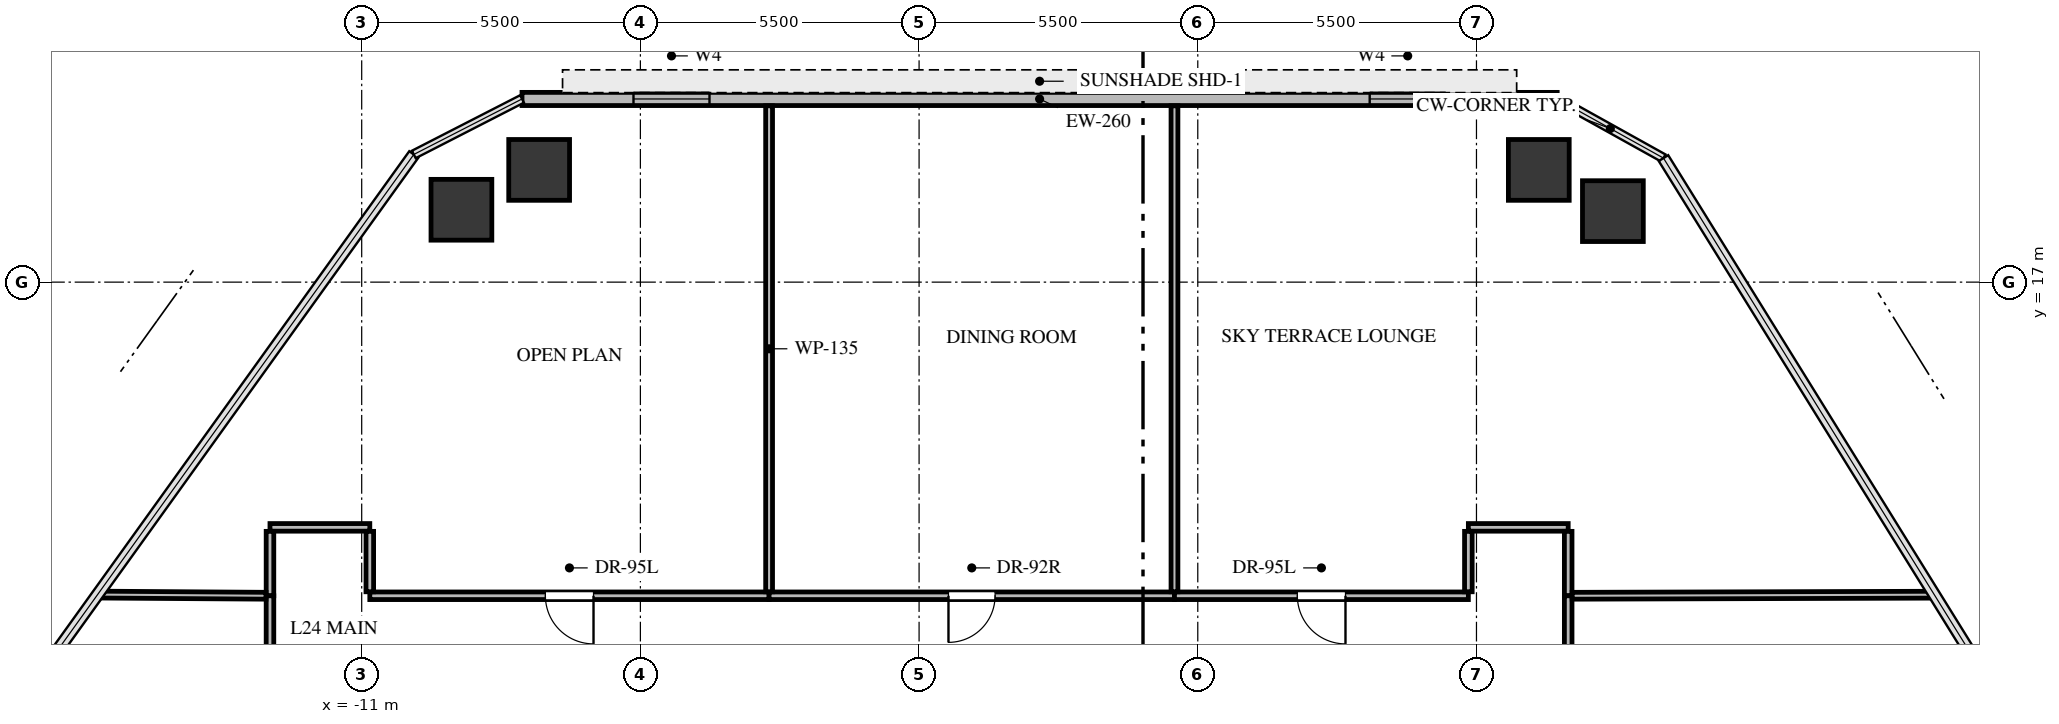
"""IFC4 building model, lengths in metres.
Left out: names, types, materials, properties, quantities, classifications, styles, units other than length and angle.
Written with IfcOpenShell. Run it as: python <this file> out.ifc"""

import sys

from ifc_helpers import new_model, si_unit, direction, frame, frame_2d, origin, origin_2d, place, context, subcontext, project, spatial, rectangle, extrude, source, transform, mapped, element, fill, save


model = new_model("IFC4")
c1 = context("Model", 3, precision=1e-05, world=origin(), true_north=direction((0.0, 1.0)))
c2 = subcontext(c1, "Body", "Model", "MODEL_VIEW")
j1 = project(units=[si_unit("LENGTHUNIT", "METRE"), si_unit("PLANEANGLEUNIT", "RADIAN")], contexts=[c1])
p1 = place(None, origin())
s1 = spatial("IfcSite", under=j1, at=p1, CompositionType="ELEMENT")
p2 = place(p1, origin())
s2 = spatial("IfcBuilding", under=s1, at=p2, CompositionType="ELEMENT")
p3 = place(p2, frame((0.0, 0.0, 93.3)))
s3 = spatial("IfcBuildingStorey", under=s2, at=p3, CompositionType="ELEMENT", Elevation=93.3)
m1 = source(origin(), c2, "Body", "SweptSolid", [
    extrude(rectangle(XDim=1.2, YDim=1.2, at=origin_2d()), origin(), (0.0, 0.0, 1.0), 4.26),
])
for number, where, z_axis, x_axis in (
    (1, (-9.032, 18.428, -0.3), (0.0, 0.0, 1.0), (1.0, 0.0, 0.0)),
    (2, (-7.498, 19.215, -0.3), (0.0, 0.0, 1.0), (1.0, 0.0, 0.0)),
    (3, (12.23, 19.215, -0.3), (0.0, 0.0, 1.0), (1.0, 0.0, 0.0)),
    (4, (13.692, 18.401, -0.3), (0.0, 0.0, 1.0), (1.0, 0.0, 0.0)),
):
    element("IfcColumn", number, at=place(p3, frame(where, z_axis=z_axis, x_axis=x_axis)), inside=s3, PredefinedType="COLUMN", context=c2, shape_type="MappedRepresentation", body=[
        mapped(m1, transform((0.0, 0.0, 0.0), x_axis=(1.0, 0.0, 0.0), y_axis=(0.0, 1.0, 0.0), z_axis=(0.0, 0.0, 1.0), scale=1.0)),
    ])
p4 = place(p3, frame((-7.836, 20.615, 0.0), z_axis=(0.0, 0.0, 1.0), x_axis=(1.0, 0.0, 0.0)))
e5 = element("IfcWall", 5, at=p4, inside=s3, PredefinedType="SOLIDWALL", context=c2, shape_type="SweptSolid", body=[
    extrude(rectangle(XDim=20.429, YDim=0.26, at=frame_2d((10.215, 0.0))), origin(), (0.0, 0.0, 1.0), 3.96),
])
p5 = place(p4, frame((2.2, 0.0, 0.9)))
e6 = element("IfcOpeningElement", 6, at=p5, cuts=e5, PredefinedType="OPENING", context=c2, shape_type="SweptSolid", body=[
    extrude(rectangle(XDim=1.5, YDim=1.6, at=frame_2d((0.75, 0.8))), frame((0.0, 0.14, 0.0), z_axis=(0.0, -1.0, 0.0), x_axis=(1.0, 0.0, 0.0)), (0.0, 0.0, 1.0), 0.28),
])
p6 = place(p4, frame((16.729, 0.0, 0.9)))
e7 = element("IfcOpeningElement", 7, at=p6, cuts=e5, PredefinedType="OPENING", context=c2, shape_type="SweptSolid", body=[
    extrude(rectangle(XDim=1.5, YDim=1.6, at=frame_2d((0.75, 0.8))), frame((0.0, 0.14, 0.0), z_axis=(0.0, -1.0, 0.0), x_axis=(1.0, 0.0, 0.0)), (0.0, 0.0, 1.0), 0.28),
])
p7 = place(p3, frame((-2.96, 10.81, 0.0), z_axis=(0.0, 0.0, 1.0), x_axis=(-1.0, 0.0, 0.0)))
e8 = element("IfcWall", 8, at=p7, inside=s3, PredefinedType="PARTITIONING", context=c2, shape_type="SweptSolid", body=[
    extrude(rectangle(XDim=7.88, YDim=0.15, at=frame_2d((3.94, 0.0))), origin(), (0.0, 0.0, 1.0), 3.112),
])
p8 = place(p7, frame((3.465, 0.0, 0.0)))
e9 = element("IfcOpeningElement", 9, at=p8, cuts=e8, PredefinedType="OPENING", context=c2, shape_type="SweptSolid", body=[
    extrude(rectangle(XDim=0.95, YDim=2.1, at=frame_2d((0.475, 1.05))), frame((0.0, 0.085, 0.0), z_axis=(0.0, -1.0, 0.0), x_axis=(1.0, 0.0, 0.0)), (0.0, 0.0, 1.0), 0.17),
])
p9 = place(p3, frame((-10.84, 12.16, 0.0), z_axis=(0.0, 0.0, 1.0), x_axis=(-1.0, 0.0, 0.0)))
e10 = element("IfcWall", 10, at=p9, inside=s3, PredefinedType="PARTITIONING", context=c2, shape_type="SweptSolid", body=[
    extrude(rectangle(XDim=1.97, YDim=0.15, at=frame_2d((0.985, 0.0))), origin(), (0.0, 0.0, 1.0), 3.945),
])
p10 = place(p3, frame((-10.84, 10.889, 0.0), z_axis=(0.0, 0.0, 1.0), x_axis=(0.0, 1.0, 0.0)))
e11 = element("IfcWall", 11, at=p10, inside=s3, PredefinedType="PARTITIONING", context=c2, shape_type="SweptSolid", body=[
    extrude(rectangle(XDim=1.192, YDim=0.15, at=frame_2d((0.596, 0.0))), origin(), (0.0, 0.0, 1.0), 3.945),
])
p11 = place(p3, frame((-12.81, 12.081, 0.0), z_axis=(0.0, 0.0, 1.0), x_axis=(0.0, -1.0, 0.0)))
e12 = element("IfcWall", 12, at=p11, inside=s3, PredefinedType="PARTITIONING", context=c2, shape_type="SweptSolid", body=[
    extrude(rectangle(XDim=1.271, YDim=0.15, at=frame_2d((0.635, 0.0))), origin(), (0.0, 0.0, 1.0), 3.945),
])
p12 = place(p3, frame((5.04, 10.81, 0.0), z_axis=(0.0, 0.0, 1.0), x_axis=(-1.0, 0.0, 0.0)))
e13 = element("IfcWall", 13, at=p12, inside=s3, PredefinedType="PARTITIONING", context=c2, shape_type="SweptSolid", body=[
    extrude(rectangle(XDim=8.0, YDim=0.15, at=frame_2d((4.0, 0.0))), origin(), (0.0, 0.0, 1.0), 3.508),
])
p13 = place(p12, frame((3.54, 0.0, 0.0)))
e14 = element("IfcOpeningElement", 14, at=p13, cuts=e13, PredefinedType="OPENING", context=c2, shape_type="SweptSolid", body=[
    extrude(rectangle(XDim=0.92, YDim=2.1, at=frame_2d((0.46, 1.05))), frame((0.0, 0.085, 0.0), z_axis=(0.0, -1.0, 0.0), x_axis=(1.0, 0.0, 0.0)), (0.0, 0.0, 1.0), 0.17),
])
p14 = place(p3, frame((10.84, 10.81, 0.0), z_axis=(0.0, 0.0, 1.0), x_axis=(-1.0, 0.0, 0.0)))
e15 = element("IfcWall", 15, at=p14, inside=s3, PredefinedType="PARTITIONING", context=c2, shape_type="SweptSolid", body=[
    extrude(rectangle(XDim=5.8, YDim=0.15, at=frame_2d((2.9, 0.0))), origin(), (0.0, 0.0, 1.0), 3.112),
])
p15 = place(p14, frame((2.425, 0.0, 0.0)))
e16 = element("IfcOpeningElement", 16, at=p15, cuts=e15, PredefinedType="OPENING", context=c2, shape_type="SweptSolid", body=[
    extrude(rectangle(XDim=0.95, YDim=2.1, at=frame_2d((0.475, 1.05))), frame((0.0, 0.085, 0.0), z_axis=(0.0, -1.0, 0.0), x_axis=(1.0, 0.0, 0.0)), (0.0, 0.0, 1.0), 0.17),
])
p16 = place(p3, frame((12.81, 12.16, 0.0), z_axis=(0.0, 0.0, 1.0), x_axis=(-1.0, 0.0, 0.0)))
e17 = element("IfcWall", 17, at=p16, inside=s3, PredefinedType="PARTITIONING", context=c2, shape_type="SweptSolid", body=[
    extrude(rectangle(XDim=1.97, YDim=0.15, at=frame_2d((0.985, 0.0))), origin(), (0.0, 0.0, 1.0), 3.112),
])
p17 = place(p3, frame((12.81, 10.81, 0.0), z_axis=(0.0, 0.0, 1.0), x_axis=(0.0, 1.0, 0.0)))
e18 = element("IfcWall", 18, at=p17, inside=s3, PredefinedType="PARTITIONING", context=c2, shape_type="SweptSolid", body=[
    extrude(rectangle(XDim=1.271, YDim=0.15, at=frame_2d((0.635, 0.0))), origin(), (0.0, 0.0, 1.0), 3.945),
])
p18 = place(p3, frame((10.84, 12.081, 0.0), z_axis=(0.0, 0.0, 1.0), x_axis=(0.0, -1.0, 0.0)))
e19 = element("IfcWall", 19, at=p18, inside=s3, PredefinedType="PARTITIONING", context=c2, shape_type="SweptSolid", body=[
    extrude(rectangle(XDim=1.192, YDim=0.15, at=frame_2d((0.596, 0.0))), origin(), (0.0, 0.0, 1.0), 3.112),
])
p19 = place(p3, frame((-12.81, 10.81, 0.0), z_axis=(0.0, 0.0, 1.0), x_axis=(0.0, -1.0, 0.0)))
e20 = element("IfcWall", 20, at=p19, inside=s3, PredefinedType="PARTITIONING", context=c2, shape_type="SweptSolid", body=[
    extrude(rectangle(XDim=21.62, YDim=0.15, at=frame_2d((10.81, 0.0))), origin(), (0.0, 0.0, 1.0), 3.112),
])
p20 = place(p19, frame((10.36, 0.0, 0.0)))
e21 = element("IfcOpeningElement", 21, at=p20, cuts=e20, PredefinedType="OPENING", context=c2, shape_type="SweptSolid", body=[
    extrude(rectangle(XDim=0.9, YDim=2.05, at=frame_2d((0.45, 1.025))), frame((0.0, 0.085, 0.0), z_axis=(0.0, -1.0, 0.0), x_axis=(1.0, 0.0, 0.0)), (0.0, 0.0, 1.0), 0.17),
])
p21 = place(p3, frame((12.81, 2.49, 0.0), z_axis=(0.0, 0.0, 1.0), x_axis=(0.0, 1.0, 0.0)))
e22 = element("IfcWall", 22, at=p21, inside=s3, PredefinedType="PARTITIONING", context=c2, shape_type="SweptSolid", body=[
    extrude(rectangle(XDim=8.32, YDim=0.15, at=frame_2d((4.16, 0.0))), origin(), (0.0, 0.0, 1.0), 3.945),
])
p22 = place(p21, frame((3.7, 0.0, 0.0)))
e23 = element("IfcOpeningElement", 23, at=p22, cuts=e22, PredefinedType="OPENING", context=c2, shape_type="SweptSolid", body=[
    extrude(rectangle(XDim=0.92, YDim=2.1, at=frame_2d((0.46, 1.05))), frame((0.0, 0.085, 0.0), z_axis=(0.0, -1.0, 0.0), x_axis=(1.0, 0.0, 0.0)), (0.0, 0.0, 1.0), 0.17),
])
p23 = place(p3, frame((-2.96, 20.48, 0.0), z_axis=(0.0, 0.0, 1.0), x_axis=(0.0, -1.0, 0.0)))
e24 = element("IfcWall", 24, at=p23, inside=s3, PredefinedType="PARTITIONING", context=c2, shape_type="SweptSolid", body=[
    extrude(rectangle(XDim=9.591, YDim=0.135, at=frame_2d((4.795, 0.0))), origin(), (0.0, 0.0, 1.0), 3.28),
])
p24 = place(p3, frame((-12.889, 10.811, 0.0), z_axis=(0.0, 0.0, 1.0), x_axis=(-0.999976657862, 0.006832549348, 0.0)))
e25 = element("IfcWall", 25, at=p24, inside=s3, PredefinedType="PARTITIONING", context=c2, shape_type="SweptSolid", body=[
    extrude(rectangle(XDim=3.323, YDim=0.135, at=frame_2d((1.662, 0.0))), origin(), (0.0, 0.0, 1.0), 3.28),
])
p25 = place(p3, frame((5.04, 20.48, 0.0), z_axis=(0.0, 0.0, 1.0), x_axis=(0.0, -1.0, 0.0)))
e26 = element("IfcWall", 26, at=p25, inside=s3, PredefinedType="PARTITIONING", context=c2, shape_type="SweptSolid", body=[
    extrude(rectangle(XDim=9.591, YDim=0.135, at=frame_2d((4.795, 0.0))), origin(), (0.0, 0.0, 1.0), 3.28),
])
p26 = place(p3, frame((20.035, 10.831, 0.0), z_axis=(0.0, 0.0, 1.0), x_axis=(-0.999995783715, -0.002903885812, 0.0)))
e27 = element("IfcWall", 27, at=p26, inside=s3, PredefinedType="PARTITIONING", context=c2, shape_type="SweptSolid", body=[
    extrude(rectangle(XDim=7.146, YDim=0.135, at=frame_2d((3.573, 0.0))), origin(), (0.0, 0.0, 1.0), 3.28),
])
m2 = source(origin(), c2, "Body", "SweptSolid", [
    extrude(rectangle(XDim=1.5, YDim=1.6, at=frame_2d((0.75, 0.8))), frame((0.0, 0.03, 0.0), z_axis=(0.0, -1.0, 0.0), x_axis=(1.0, 0.0, 0.0)), (0.0, 0.0, 1.0), 0.06),
])
p27 = place(p5, origin())
e28 = element("IfcWindow", 28, at=p27, inside=s3, PartitioningType="SINGLE_PANEL", PredefinedType="WINDOW", context=c2, shape_type="MappedRepresentation", body=[
    mapped(m2, transform((0.0, 0.0, 0.0), x_axis=(1.0, 0.0, 0.0), y_axis=(0.0, 1.0, 0.0), z_axis=(0.0, 0.0, 1.0), scale=1.0)),
])
fill(e6, e28)
p28 = place(p6, origin())
e29 = element("IfcWindow", 29, at=p28, inside=s3, PartitioningType="SINGLE_PANEL", PredefinedType="WINDOW", context=c2, shape_type="MappedRepresentation", body=[
    mapped(m2, transform((0.0, 0.0, 0.0), x_axis=(1.0, 0.0, 0.0), y_axis=(0.0, 1.0, 0.0), z_axis=(0.0, 0.0, 1.0), scale=1.0)),
])
fill(e7, e29)
m3 = source(origin(), c2, "Body", "SweptSolid", [
    extrude(rectangle(XDim=0.95, YDim=2.1, at=frame_2d((0.475, 1.05))), frame((0.0, 0.025, 0.0), z_axis=(0.0, -1.0, 0.0), x_axis=(1.0, 0.0, 0.0)), (0.0, 0.0, 1.0), 0.05),
])
p29 = place(p8, origin())
e30 = element("IfcDoor", 30, at=p29, inside=s3, OperationType="SINGLE_SWING_LEFT", PredefinedType="DOOR", context=c2, shape_type="MappedRepresentation", body=[
    mapped(m3, transform((0.0, 0.0, 0.0), x_axis=(1.0, 0.0, 0.0), y_axis=(0.0, 1.0, 0.0), z_axis=(0.0, 0.0, 1.0), scale=1.0)),
])
fill(e9, e30)
m4 = source(origin(), c2, "Body", "SweptSolid", [
    extrude(rectangle(XDim=0.92, YDim=2.1, at=frame_2d((0.46, 1.05))), frame((0.0, 0.025, 0.0), z_axis=(0.0, -1.0, 0.0), x_axis=(1.0, 0.0, 0.0)), (0.0, 0.0, 1.0), 0.05),
])
p30 = place(p13, origin())
e31 = element("IfcDoor", 31, at=p30, inside=s3, OperationType="SINGLE_SWING_RIGHT", PredefinedType="DOOR", context=c2, shape_type="MappedRepresentation", body=[
    mapped(m4, transform((0.0, 0.0, 0.0), x_axis=(1.0, 0.0, 0.0), y_axis=(0.0, 1.0, 0.0), z_axis=(0.0, 0.0, 1.0), scale=1.0)),
])
fill(e14, e31)
p31 = place(p15, origin())
e32 = element("IfcDoor", 32, at=p31, inside=s3, OperationType="SINGLE_SWING_LEFT", PredefinedType="DOOR", context=c2, shape_type="MappedRepresentation", body=[
    mapped(m3, transform((0.0, 0.0, 0.0), x_axis=(1.0, 0.0, 0.0), y_axis=(0.0, 1.0, 0.0), z_axis=(0.0, 0.0, 1.0), scale=1.0)),
])
fill(e16, e32)
save(model, sys.argv[1])
